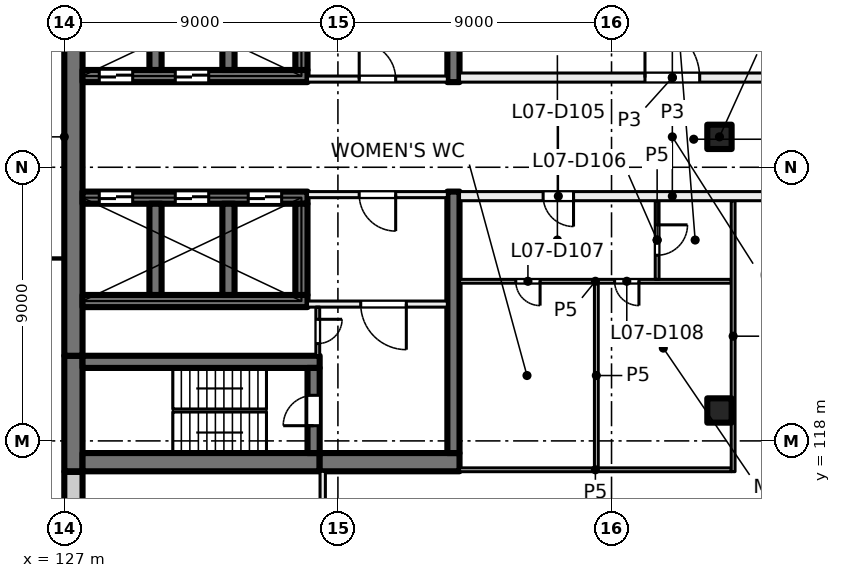
"""IFC4 building model, lengths in metres.
Left out: names, types, materials, properties, quantities, classifications, styles, units other than length and angle.
Written with IfcOpenShell. Run it as: python <this file> out.ifc"""

import sys

from ifc_helpers import new_model, si_unit, direction, frame, frame_2d, origin, origin_2d, place, context, subcontext, project, spatial, rectangle, extrude, element, fill, save


model = new_model("IFC4")
c1 = context("Model", 3, precision=1e-05, world=origin(), true_north=direction((0.0, 1.0)))
c2 = subcontext(c1, "Body", "Model", "MODEL_VIEW")
j1 = project(units=[si_unit("LENGTHUNIT", "METRE"), si_unit("PLANEANGLEUNIT", "RADIAN")], contexts=[c1])
p1 = place(None, origin())
s1 = spatial("IfcSite", under=j1, at=p1, CompositionType="ELEMENT")
p2 = place(p1, origin())
s2 = spatial("IfcBuilding", under=s1, at=p2, CompositionType="ELEMENT")
p3 = place(p2, frame((0.0, 0.0, 35.5)))
s3 = spatial("IfcBuildingStorey", under=s2, at=p3, CompositionType="ELEMENT", Elevation=35.5)
for number, where, z_axis, x_axis in (
    (1, (148.55, 119.0, 0.0), (0.0, 0.0, 1.0), (1.0, 0.0, 0.0)),
    (2, (148.55, 128.0, 0.0), (0.0, 0.0, 1.0), (1.0, 0.0, 0.0)),
):
    element("IfcColumn", number, at=place(p3, frame(where, z_axis=z_axis, x_axis=x_axis)), inside=s3, PredefinedType="COLUMN", context=c2, shape_type="SweptSolid", body=[
        extrude(rectangle(XDim=0.8, YDim=0.8, at=origin_2d()), origin(), (0.0, 0.0, 1.0), 4.0),
    ])
p4 = place(p3, frame((127.3, 117.0, 0.0), z_axis=(0.0, 0.0, 1.0), x_axis=(0.0, 1.0, 0.0)))
e3 = element("IfcWall", 3, at=p4, inside=s3, PredefinedType="SHEAR", context=c2, shape_type="SweptSolid", body=[
    extrude(rectangle(XDim=3.8, YDim=0.6, at=frame_2d((1.9, 0.0))), origin(), (0.0, 0.0, 1.0), 4.0),
])
p5 = place(p3, frame((127.3, 120.8, 0.0), z_axis=(0.0, 0.0, 1.0), x_axis=(0.0, 1.0, 0.0)))
e4 = element("IfcWall", 4, at=p5, inside=s3, PredefinedType="SHEAR", context=c2, shape_type="SweptSolid", body=[
    extrude(rectangle(XDim=14.4, YDim=0.6, at=frame_2d((7.2, 0.0))), origin(), (0.0, 0.0, 1.0), 4.0),
])
p6 = place(p3, frame((127.6, 117.3, 0.0), z_axis=(0.0, 0.0, 1.0), x_axis=(1.0, 0.0, 0.0)))
e5 = element("IfcWall", 5, at=p6, inside=s3, PredefinedType="SHEAR", context=c2, shape_type="SweptSolid", body=[
    extrude(rectangle(XDim=7.8, YDim=0.6, at=frame_2d((3.9, 0.0))), origin(), (0.0, 0.0, 1.0), 4.0),
])
p7 = place(p3, frame((135.4, 117.3, 0.0), z_axis=(0.0, 0.0, 1.0), x_axis=(1.0, 0.0, 0.0)))
e6 = element("IfcWall", 6, at=p7, inside=s3, PredefinedType="SHEAR", context=c2, shape_type="SweptSolid", body=[
    extrude(rectangle(XDim=4.6, YDim=0.6, at=frame_2d((2.3, 0.0))), origin(), (0.0, 0.0, 1.0), 4.0),
])
p8 = place(p3, frame((127.6, 120.6, 0.0), z_axis=(0.0, 0.0, 1.0), x_axis=(1.0, 0.0, 0.0)))
e7 = element("IfcWall", 7, at=p8, inside=s3, PredefinedType="SHEAR", context=c2, shape_type="SweptSolid", body=[
    extrude(rectangle(XDim=7.8, YDim=0.4, at=frame_2d((3.9, 0.0))), origin(), (0.0, 0.0, 1.0), 4.0),
])
p9 = place(p3, frame((135.2, 117.6, 0.0), z_axis=(0.0, 0.0, 1.0), x_axis=(0.0, 1.0, 0.0)))
e8 = element("IfcWall", 8, at=p9, inside=s3, PredefinedType="SHEAR", context=c2, shape_type="SweptSolid", body=[
    extrude(rectangle(XDim=2.8, YDim=0.4, at=frame_2d((1.4, 0.0))), origin(), (0.0, 0.0, 1.0), 4.0),
])
p10 = place(p9, frame((0.9, 0.0, 0.0)))
e9 = element("IfcOpeningElement", 9, at=p10, cuts=e8, PredefinedType="OPENING", context=c2, shape_type="SweptSolid", body=[
    extrude(rectangle(XDim=1.0, YDim=2.1, at=frame_2d((0.5, 1.05))), frame((0.0, 0.21, 0.0), z_axis=(0.0, -1.0, 0.0), x_axis=(1.0, 0.0, 0.0)), (0.0, 0.0, 1.0), 0.42),
])
p11 = place(p3, frame((127.6, 126.0, 0.0), z_axis=(0.0, 0.0, 1.0), x_axis=(1.0, 0.0, 0.0)))
e10 = element("IfcWall", 10, at=p11, inside=s3, PredefinedType="SHEAR", context=c2, shape_type="SweptSolid", body=[
    extrude(rectangle(XDim=7.4, YDim=0.4, at=frame_2d((3.7, 0.0))), origin(), (0.0, 0.0, 1.0), 4.0),
])
p12 = place(p11, frame((0.55, 0.0, 0.0)))
e11 = element("IfcOpeningElement", 11, at=p12, cuts=e10, PredefinedType="OPENING", context=c2, shape_type="SweptSolid", body=[
    extrude(rectangle(XDim=1.1, YDim=2.1, at=frame_2d((0.55, 1.05))), frame((0.0, 0.21, 0.0), z_axis=(0.0, -1.0, 0.0), x_axis=(1.0, 0.0, 0.0)), (0.0, 0.0, 1.0), 0.42),
])
p13 = place(p11, frame((3.05, 0.0, 0.0)))
e12 = element("IfcOpeningElement", 12, at=p13, cuts=e10, PredefinedType="OPENING", context=c2, shape_type="SweptSolid", body=[
    extrude(rectangle(XDim=1.1, YDim=2.1, at=frame_2d((0.55, 1.05))), frame((0.0, 0.21, 0.0), z_axis=(0.0, -1.0, 0.0), x_axis=(1.0, 0.0, 0.0)), (0.0, 0.0, 1.0), 0.42),
])
p14 = place(p11, frame((5.45, 0.0, 0.0)))
e13 = element("IfcOpeningElement", 13, at=p14, cuts=e10, PredefinedType="OPENING", context=c2, shape_type="SweptSolid", body=[
    extrude(rectangle(XDim=1.1, YDim=2.1, at=frame_2d((0.55, 1.05))), frame((0.0, 0.21, 0.0), z_axis=(0.0, -1.0, 0.0), x_axis=(1.0, 0.0, 0.0)), (0.0, 0.0, 1.0), 0.42),
])
p15 = place(p3, frame((127.6, 122.6, 0.0), z_axis=(0.0, 0.0, 1.0), x_axis=(1.0, 0.0, 0.0)))
e14 = element("IfcWall", 14, at=p15, inside=s3, PredefinedType="SHEAR", context=c2, shape_type="SweptSolid", body=[
    extrude(rectangle(XDim=7.4, YDim=0.4, at=frame_2d((3.7, 0.0))), origin(), (0.0, 0.0, 1.0), 4.0),
])
for number, where, z_axis, x_axis in (
    (15, (130.0, 122.8, 0.0), (0.0, 0.0, 1.0), (0.0, 1.0, 0.0)),
    (16, (132.4, 122.8, 0.0), (0.0, 0.0, 1.0), (0.0, 1.0, 0.0)),
    (17, (134.8, 122.8, 0.0), (0.0, 0.0, 1.0), (0.0, 1.0, 0.0)),
):
    element("IfcWall", number, at=place(p3, frame(where, z_axis=z_axis, x_axis=x_axis)), inside=s3, PredefinedType="SHEAR", context=c2, shape_type="SweptSolid", body=[
        extrude(rectangle(XDim=3.0, YDim=0.4, at=frame_2d((1.5, 0.0))), origin(), (0.0, 0.0, 1.0), 4.0),
    ])
p16 = place(p3, frame((127.6, 130.0, 0.0), z_axis=(0.0, 0.0, 1.0), x_axis=(1.0, 0.0, 0.0)))
e18 = element("IfcWall", 18, at=p16, inside=s3, PredefinedType="SHEAR", context=c2, shape_type="SweptSolid", body=[
    extrude(rectangle(XDim=7.4, YDim=0.4, at=frame_2d((3.7, 0.0))), origin(), (0.0, 0.0, 1.0), 4.0),
])
p17 = place(p16, frame((0.55, 0.0, 0.0)))
e19 = element("IfcOpeningElement", 19, at=p17, cuts=e18, PredefinedType="OPENING", context=c2, shape_type="SweptSolid", body=[
    extrude(rectangle(XDim=1.1, YDim=2.1, at=frame_2d((0.55, 1.05))), frame((0.0, 0.21, 0.0), z_axis=(0.0, -1.0, 0.0), x_axis=(1.0, 0.0, 0.0)), (0.0, 0.0, 1.0), 0.42),
])
p18 = place(p16, frame((3.05, 0.0, 0.0)))
e20 = element("IfcOpeningElement", 20, at=p18, cuts=e18, PredefinedType="OPENING", context=c2, shape_type="SweptSolid", body=[
    extrude(rectangle(XDim=1.1, YDim=2.1, at=frame_2d((0.55, 1.05))), frame((0.0, 0.21, 0.0), z_axis=(0.0, -1.0, 0.0), x_axis=(1.0, 0.0, 0.0)), (0.0, 0.0, 1.0), 0.42),
])
for number, where, z_axis, x_axis in (
    (21, (130.0, 130.2, 0.0), (0.0, 0.0, 1.0), (0.0, 1.0, 0.0)),
    (22, (132.4, 130.2, 0.0), (0.0, 0.0, 1.0), (0.0, 1.0, 0.0)),
):
    element("IfcWall", number, at=place(p3, frame(where, z_axis=z_axis, x_axis=x_axis)), inside=s3, PredefinedType="SHEAR", context=c2, shape_type="SweptSolid", body=[
        extrude(rectangle(XDim=3.0, YDim=0.4, at=frame_2d((1.5, 0.0))), origin(), (0.0, 0.0, 1.0), 4.0),
    ])
p19 = place(p3, frame((134.8, 130.2, 0.0), z_axis=(0.0, 0.0, 1.0), x_axis=(0.0, 1.0, 0.0)))
e23 = element("IfcWall", 23, at=p19, inside=s3, PredefinedType="SHEAR", context=c2, shape_type="SweptSolid", body=[
    extrude(rectangle(XDim=3.0, YDim=0.4, at=frame_2d((1.5, 0.0))), origin(), (0.0, 0.0, 1.0), 4.0),
])
p20 = place(p19, frame((0.95, 0.0, 0.0)))
e24 = element("IfcOpeningElement", 24, at=p20, cuts=e23, PredefinedType="OPENING", context=c2, shape_type="SweptSolid", body=[
    extrude(rectangle(XDim=1.1, YDim=2.1, at=frame_2d((0.55, 1.05))), frame((0.0, 0.21, 0.0), z_axis=(0.0, -1.0, 0.0), x_axis=(1.0, 0.0, 0.0)), (0.0, 0.0, 1.0), 0.42),
])
for number, where, z_axis, x_axis in (
    (25, (139.8, 117.6, 0.0), (0.0, 0.0, 1.0), (0.0, 1.0, 0.0)),
    (26, (139.8, 129.8, 0.0), (0.0, 0.0, 1.0), (0.0, 1.0, 0.0)),
):
    element("IfcWall", number, at=place(p3, frame(where, z_axis=z_axis, x_axis=x_axis)), inside=s3, PredefinedType="SHEAR", context=c2, shape_type="SweptSolid", body=[
        extrude(rectangle(XDim=8.6, YDim=0.4, at=frame_2d((4.3, 0.0))), origin(), (0.0, 0.0, 1.0), 4.0),
    ])
p21 = place(p3, frame((127.3, 114.07, 0.0), z_axis=(0.0, 0.0, 1.0), x_axis=(0.0, 1.0, 0.0)))
e27 = element("IfcWall", 27, at=p21, inside=s3, PredefinedType="SOLIDWALL", context=c2, shape_type="SweptSolid", body=[
    extrude(rectangle(XDim=2.91, YDim=0.6, at=frame_2d((1.455, 0.0))), origin(), (0.0, 0.0, 1.0), 3.625),
])
p22 = place(p3, frame((135.0, 129.9, 0.0), z_axis=(0.0, 0.0, 1.0), x_axis=(1.0, 0.0, 0.0)))
e28 = element("IfcWall", 28, at=p22, inside=s3, PredefinedType="PARTITIONING", context=c2, shape_type="SweptSolid", body=[
    extrude(rectangle(XDim=4.6, YDim=0.2, at=frame_2d((2.3, 0.0))), origin(), (0.0, 0.0, 1.0), 3.625),
])
p23 = place(p22, frame((1.7, 0.0, 0.0)))
e29 = element("IfcOpeningElement", 29, at=p23, cuts=e28, PredefinedType="OPENING", context=c2, shape_type="SweptSolid", body=[
    extrude(rectangle(XDim=1.2, YDim=2.1, at=frame_2d((0.6, 1.05))), frame((0.0, 0.11, 0.0), z_axis=(0.0, -1.0, 0.0), x_axis=(1.0, 0.0, 0.0)), (0.0, 0.0, 1.0), 0.22),
])
p24 = place(p3, frame((139.6, 126.1, 0.0), z_axis=(0.0, 0.0, 1.0), x_axis=(-1.0, 0.0, 0.0)))
e30 = element("IfcWall", 30, at=p24, inside=s3, PredefinedType="PARTITIONING", context=c2, shape_type="SweptSolid", body=[
    extrude(rectangle(XDim=4.6, YDim=0.2, at=frame_2d((2.3, 0.0))), origin(), (0.0, 0.0, 1.0), 3.625),
])
p25 = place(p24, frame((1.7, 0.0, 0.0)))
e31 = element("IfcOpeningElement", 31, at=p25, cuts=e30, PredefinedType="OPENING", context=c2, shape_type="SweptSolid", body=[
    extrude(rectangle(XDim=1.2, YDim=2.1, at=frame_2d((0.6, 1.05))), frame((0.0, 0.11, 0.0), z_axis=(0.0, -1.0, 0.0), x_axis=(1.0, 0.0, 0.0)), (0.0, 0.0, 1.0), 0.22),
])
p26 = place(p3, frame((139.6, 122.5, 0.0), z_axis=(0.0, 0.0, 1.0), x_axis=(-1.0, 0.0, 0.0)))
e32 = element("IfcWall", 32, at=p26, inside=s3, PredefinedType="PARTITIONING", context=c2, shape_type="SweptSolid", body=[
    extrude(rectangle(XDim=4.6, YDim=0.2, at=frame_2d((2.3, 0.0))), origin(), (0.0, 0.0, 1.0), 3.625),
])
p27 = place(p26, frame((1.35, 0.0, 0.0)))
e33 = element("IfcOpeningElement", 33, at=p27, cuts=e32, PredefinedType="OPENING", context=c2, shape_type="SweptSolid", body=[
    extrude(rectangle(XDim=1.5, YDim=2.1, at=frame_2d((0.75, 1.05))), frame((0.0, 0.11, 0.0), z_axis=(0.0, -1.0, 0.0), x_axis=(1.0, 0.0, 0.0)), (0.0, 0.0, 1.0), 0.22),
])
p28 = place(p3, frame((135.337, 122.4, 0.0), z_axis=(0.0, 0.0, 1.0), x_axis=(0.0, -1.0, 0.0)))
e34 = element("IfcWall", 34, at=p28, inside=s3, PredefinedType="PARTITIONING", context=c2, shape_type="SweptSolid", body=[
    extrude(rectangle(XDim=1.6, YDim=0.125, at=frame_2d((0.8, 0.0))), origin(), (0.0, 0.0, 1.0), 3.625),
])
p29 = place(p28, frame((0.4, 0.0, 0.0)))
e35 = element("IfcOpeningElement", 35, at=p29, cuts=e34, PredefinedType="OPENING", context=c2, shape_type="SweptSolid", body=[
    extrude(rectangle(XDim=0.8, YDim=2.1, at=frame_2d((0.4, 1.05))), frame((0.0, 0.073, 0.0), z_axis=(0.0, -1.0, 0.0), x_axis=(1.0, 0.0, 0.0)), (0.0, 0.0, 1.0), 0.145),
])
p30 = place(p3, frame((135.5, 117.0, 0.0), z_axis=(0.0, 0.0, 1.0), x_axis=(0.0, -1.0, 0.0)))
e36 = element("IfcWall", 36, at=p30, inside=s3, PredefinedType="PARTITIONING", context=c2, shape_type="SweptSolid", body=[
    extrude(rectangle(XDim=6.4, YDim=0.175, at=frame_2d((3.2, 0.0))), origin(), (0.0, 0.0, 1.0), 3.625),
])
p31 = place(p30, frame((2.6, 0.0, 0.0)))
e37 = element("IfcOpeningElement", 37, at=p31, cuts=e36, PredefinedType="OPENING", context=c2, shape_type="SweptSolid", body=[
    extrude(rectangle(XDim=1.2, YDim=2.1, at=frame_2d((0.6, 1.05))), frame((0.0, 0.097, 0.0), z_axis=(0.0, -1.0, 0.0), x_axis=(1.0, 0.0, 0.0)), (0.0, 0.0, 1.0), 0.195),
])
p32 = place(p3, frame((140.0, 117.05, 0.0), z_axis=(0.0, 0.0, 1.0), x_axis=(1.0, 0.0, 0.0)))
e38 = element("IfcWall", 38, at=p32, inside=s3, PredefinedType="PARTITIONING", context=c2, shape_type="SweptSolid", body=[
    extrude(rectangle(XDim=8.938, YDim=0.125, at=frame_2d((4.469, 0.0))), origin(), (0.0, 0.0, 1.0), 3.625),
])
p33 = place(p3, frame((148.938, 123.25, 0.0), z_axis=(0.0, 0.0, 1.0), x_axis=(-1.0, 0.0, 0.0)))
e39 = element("IfcWall", 39, at=p33, inside=s3, PredefinedType="PARTITIONING", context=c2, shape_type="SweptSolid", body=[
    extrude(rectangle(XDim=8.938, YDim=0.125, at=frame_2d((4.469, 0.0))), origin(), (0.0, 0.0, 1.0), 3.625),
])
p34 = place(p33, frame((6.288, 0.0, 0.0)))
e40 = element("IfcOpeningElement", 40, at=p34, cuts=e39, PredefinedType="OPENING", context=c2, shape_type="SweptSolid", body=[
    extrude(rectangle(XDim=0.8, YDim=2.1, at=frame_2d((0.4, 1.05))), frame((0.0, 0.073, 0.0), z_axis=(0.0, -1.0, 0.0), x_axis=(1.0, 0.0, 0.0)), (0.0, 0.0, 1.0), 0.145),
])
p35 = place(p33, frame((3.037, 0.0, 0.0)))
e41 = element("IfcOpeningElement", 41, at=p35, cuts=e39, PredefinedType="OPENING", context=c2, shape_type="SweptSolid", body=[
    extrude(rectangle(XDim=0.8, YDim=2.1, at=frame_2d((0.4, 1.05))), frame((0.0, 0.073, 0.0), z_axis=(0.0, -1.0, 0.0), x_axis=(1.0, 0.0, 0.0)), (0.0, 0.0, 1.0), 0.145),
])
p36 = place(p3, frame((140.0, 129.95, 0.0), z_axis=(0.0, 0.0, 1.0), x_axis=(1.0, 0.0, 0.0)))
e42 = element("IfcWall", 42, at=p36, inside=s3, PredefinedType="PARTITIONING", context=c2, shape_type="SweptSolid", body=[
    extrude(rectangle(XDim=14.0, YDim=0.3, at=frame_2d((7.0, 0.0))), origin(), (0.0, 0.0, 1.0), 3.625),
])
p37 = place(p36, frame((6.1, 0.0, 0.0)))
e43 = element("IfcOpeningElement", 43, at=p37, cuts=e42, PredefinedType="OPENING", context=c2, shape_type="SweptSolid", body=[
    extrude(rectangle(XDim=1.8, YDim=2.1, at=frame_2d((0.9, 1.05))), frame((0.0, 0.16, 0.0), z_axis=(0.0, -1.0, 0.0), x_axis=(1.0, 0.0, 0.0)), (0.0, 0.0, 1.0), 0.32),
])
p38 = place(p3, frame((144.5, 117.112, 0.0), z_axis=(0.0, 0.0, 1.0), x_axis=(0.0, 1.0, 0.0)))
e44 = element("IfcWall", 44, at=p38, inside=s3, PredefinedType="PARTITIONING", context=c2, shape_type="SweptSolid", body=[
    extrude(rectangle(XDim=6.076, YDim=0.125, at=frame_2d((3.038, 0.0))), origin(), (0.0, 0.0, 1.0), 3.625),
])
p39 = place(p3, frame((146.5, 125.9, 0.0), z_axis=(0.0, 0.0, 1.0), x_axis=(0.0, -1.0, 0.0)))
e45 = element("IfcWall", 45, at=p39, inside=s3, PredefinedType="PARTITIONING", context=c2, shape_type="SweptSolid", body=[
    extrude(rectangle(XDim=2.588, YDim=0.125, at=frame_2d((1.294, 0.0))), origin(), (0.0, 0.0, 1.0), 3.625),
])
p40 = place(p39, frame((0.794, 0.0, 0.0)))
e46 = element("IfcOpeningElement", 46, at=p40, cuts=e45, PredefinedType="OPENING", context=c2, shape_type="SweptSolid", body=[
    extrude(rectangle(XDim=1.0, YDim=2.1, at=frame_2d((0.5, 1.05))), frame((0.0, 0.073, 0.0), z_axis=(0.0, -1.0, 0.0), x_axis=(1.0, 0.0, 0.0)), (0.0, 0.0, 1.0), 0.145),
])
p41 = place(p3, frame((149.0, 116.988, 0.0), z_axis=(0.0, 0.0, 1.0), x_axis=(0.0, 1.0, 0.0)))
e47 = element("IfcWall", 47, at=p41, inside=s3, PredefinedType="PARTITIONING", context=c2, shape_type="SweptSolid", body=[
    extrude(rectangle(XDim=8.912, YDim=0.125, at=frame_2d((4.456, 0.0))), origin(), (0.0, 0.0, 1.0), 3.625),
])
p42 = place(p3, frame((154.0, 126.05, 0.0), z_axis=(0.0, 0.0, 1.0), x_axis=(-1.0, 0.0, 0.0)))
e48 = element("IfcWall", 48, at=p42, inside=s3, PredefinedType="PARTITIONING", context=c2, shape_type="SweptSolid", body=[
    extrude(rectangle(XDim=14.0, YDim=0.3, at=frame_2d((7.0, 0.0))), origin(), (0.0, 0.0, 1.0), 3.625),
])
p43 = place(p42, frame((10.25, 0.0, 0.0)))
e49 = element("IfcOpeningElement", 49, at=p43, cuts=e48, PredefinedType="OPENING", context=c2, shape_type="SweptSolid", body=[
    extrude(rectangle(XDim=1.0, YDim=2.1, at=frame_2d((0.5, 1.05))), frame((0.0, 0.16, 0.0), z_axis=(0.0, -1.0, 0.0), x_axis=(1.0, 0.0, 0.0)), (0.0, 0.0, 1.0), 0.32),
])
p44 = place(p42, frame((1.6, 0.0, 0.0)))
e50 = element("IfcOpeningElement", 50, at=p44, cuts=e48, PredefinedType="OPENING", context=c2, shape_type="SweptSolid", body=[
    extrude(rectangle(XDim=1.8, YDim=2.1, at=frame_2d((0.9, 1.05))), frame((0.0, 0.16, 0.0), z_axis=(0.0, -1.0, 0.0), x_axis=(1.0, 0.0, 0.0)), (0.0, 0.0, 1.0), 0.32),
])
p45 = place(p17, origin())
e51 = element("IfcDoor", 51, at=p45, inside=s3, OperationType="DOUBLE_DOOR_SLIDING", PredefinedType="DOOR", context=c2, shape_type="SweptSolid", body=[
    extrude(rectangle(XDim=1.1, YDim=2.1, at=frame_2d((0.55, 1.05))), frame((0.0, 0.025, 0.0), z_axis=(0.0, -1.0, 0.0), x_axis=(1.0, 0.0, 0.0)), (0.0, 0.0, 1.0), 0.05),
])
fill(e19, e51)
p46 = place(p18, origin())
e52 = element("IfcDoor", 52, at=p46, inside=s3, OperationType="DOUBLE_DOOR_SLIDING", PredefinedType="DOOR", context=c2, shape_type="SweptSolid", body=[
    extrude(rectangle(XDim=1.1, YDim=2.1, at=frame_2d((0.55, 1.05))), frame((0.0, 0.025, 0.0), z_axis=(0.0, -1.0, 0.0), x_axis=(1.0, 0.0, 0.0)), (0.0, 0.0, 1.0), 0.05),
])
fill(e20, e52)
p47 = place(p12, origin())
e53 = element("IfcDoor", 53, at=p47, inside=s3, OperationType="DOUBLE_DOOR_SLIDING", PredefinedType="DOOR", context=c2, shape_type="SweptSolid", body=[
    extrude(rectangle(XDim=1.1, YDim=2.1, at=frame_2d((0.55, 1.05))), frame((0.0, 0.025, 0.0), z_axis=(0.0, -1.0, 0.0), x_axis=(1.0, 0.0, 0.0)), (0.0, 0.0, 1.0), 0.05),
])
fill(e11, e53)
p48 = place(p13, origin())
e54 = element("IfcDoor", 54, at=p48, inside=s3, OperationType="DOUBLE_DOOR_SLIDING", PredefinedType="DOOR", context=c2, shape_type="SweptSolid", body=[
    extrude(rectangle(XDim=1.1, YDim=2.1, at=frame_2d((0.55, 1.05))), frame((0.0, 0.025, 0.0), z_axis=(0.0, -1.0, 0.0), x_axis=(1.0, 0.0, 0.0)), (0.0, 0.0, 1.0), 0.05),
])
fill(e12, e54)
p49 = place(p14, origin())
e55 = element("IfcDoor", 55, at=p49, inside=s3, OperationType="DOUBLE_DOOR_SLIDING", PredefinedType="DOOR", context=c2, shape_type="SweptSolid", body=[
    extrude(rectangle(XDim=1.1, YDim=2.1, at=frame_2d((0.55, 1.05))), frame((0.0, 0.025, 0.0), z_axis=(0.0, -1.0, 0.0), x_axis=(1.0, 0.0, 0.0)), (0.0, 0.0, 1.0), 0.05),
])
fill(e13, e55)
p50 = place(p23, origin())
e56 = element("IfcDoor", 56, at=p50, inside=s3, OperationType="DOUBLE_DOOR_SINGLE_SWING", PredefinedType="DOOR", context=c2, shape_type="SweptSolid", body=[
    extrude(rectangle(XDim=1.2, YDim=2.1, at=frame_2d((0.6, 1.05))), frame((0.0, 0.025, 0.0), z_axis=(0.0, -1.0, 0.0), x_axis=(1.0, 0.0, 0.0)), (0.0, 0.0, 1.0), 0.05),
])
fill(e29, e56)
p51 = place(p25, origin())
e57 = element("IfcDoor", 57, at=p51, inside=s3, OperationType="DOUBLE_DOOR_SINGLE_SWING", PredefinedType="DOOR", context=c2, shape_type="SweptSolid", body=[
    extrude(rectangle(XDim=1.2, YDim=2.1, at=frame_2d((0.6, 1.05))), frame((0.0, 0.025, 0.0), z_axis=(0.0, -1.0, 0.0), x_axis=(1.0, 0.0, 0.0)), (0.0, 0.0, 1.0), 0.05),
])
fill(e31, e57)
p52 = place(p27, origin())
e58 = element("IfcDoor", 58, at=p52, inside=s3, OperationType="DOUBLE_DOOR_SINGLE_SWING", PredefinedType="DOOR", context=c2, shape_type="SweptSolid", body=[
    extrude(rectangle(XDim=1.5, YDim=2.1, at=frame_2d((0.75, 1.05))), frame((0.0, 0.025, 0.0), z_axis=(0.0, -1.0, 0.0), x_axis=(1.0, 0.0, 0.0)), (0.0, 0.0, 1.0), 0.05),
])
fill(e33, e58)
p53 = place(p10, origin())
e59 = element("IfcDoor", 59, at=p53, inside=s3, OperationType="SINGLE_SWING_RIGHT", PredefinedType="DOOR", context=c2, shape_type="SweptSolid", body=[
    extrude(rectangle(XDim=1.0, YDim=2.1, at=frame_2d((0.5, 1.05))), frame((0.0, 0.025, 0.0), z_axis=(0.0, -1.0, 0.0), x_axis=(1.0, 0.0, 0.0)), (0.0, 0.0, 1.0), 0.05),
])
fill(e9, e59)
p54 = place(p29, origin())
e60 = element("IfcDoor", 60, at=p54, inside=s3, OperationType="SINGLE_SWING_LEFT", PredefinedType="DOOR", context=c2, shape_type="SweptSolid", body=[
    extrude(rectangle(XDim=0.8, YDim=2.1, at=frame_2d((0.4, 1.05))), frame((0.0, 0.025, 0.0), z_axis=(0.0, -1.0, 0.0), x_axis=(1.0, 0.0, 0.0)), (0.0, 0.0, 1.0), 0.05),
])
fill(e35, e60)
p55 = place(p37, origin())
e61 = element("IfcDoor", 61, at=p55, inside=s3, OperationType="DOUBLE_DOOR_SINGLE_SWING", PredefinedType="DOOR", context=c2, shape_type="SweptSolid", body=[
    extrude(rectangle(XDim=1.8, YDim=2.1, at=frame_2d((0.9, 1.05))), frame((0.0, 0.025, 0.0), z_axis=(0.0, -1.0, 0.0), x_axis=(1.0, 0.0, 0.0)), (0.0, 0.0, 1.0), 0.05),
])
fill(e43, e61)
p56 = place(p43, origin())
e62 = element("IfcDoor", 62, at=p56, inside=s3, OperationType="SINGLE_SWING_RIGHT", PredefinedType="DOOR", context=c2, shape_type="SweptSolid", body=[
    extrude(rectangle(XDim=1.0, YDim=2.1, at=frame_2d((0.5, 1.05))), frame((0.0, 0.025, 0.0), z_axis=(0.0, -1.0, 0.0), x_axis=(1.0, 0.0, 0.0)), (0.0, 0.0, 1.0), 0.05),
])
fill(e49, e62)
p57 = place(p40, origin())
e63 = element("IfcDoor", 63, at=p57, inside=s3, OperationType="SINGLE_SWING_RIGHT", PredefinedType="DOOR", context=c2, shape_type="SweptSolid", body=[
    extrude(rectangle(XDim=1.0, YDim=2.1, at=frame_2d((0.5, 1.05))), frame((0.0, 0.025, 0.0), z_axis=(0.0, -1.0, 0.0), x_axis=(1.0, 0.0, 0.0)), (0.0, 0.0, 1.0), 0.05),
])
fill(e46, e63)
p58 = place(p34, origin())
e64 = element("IfcDoor", 64, at=p58, inside=s3, OperationType="SINGLE_SWING_RIGHT", PredefinedType="DOOR", context=c2, shape_type="SweptSolid", body=[
    extrude(rectangle(XDim=0.8, YDim=2.1, at=frame_2d((0.4, 1.05))), frame((0.0, 0.025, 0.0), z_axis=(0.0, -1.0, 0.0), x_axis=(1.0, 0.0, 0.0)), (0.0, 0.0, 1.0), 0.05),
])
fill(e40, e64)
p59 = place(p35, origin())
e65 = element("IfcDoor", 65, at=p59, inside=s3, OperationType="SINGLE_SWING_LEFT", PredefinedType="DOOR", context=c2, shape_type="SweptSolid", body=[
    extrude(rectangle(XDim=0.8, YDim=2.1, at=frame_2d((0.4, 1.05))), frame((0.0, 0.025, 0.0), z_axis=(0.0, -1.0, 0.0), x_axis=(1.0, 0.0, 0.0)), (0.0, 0.0, 1.0), 0.05),
])
fill(e41, e65)
save(model, sys.argv[1])
